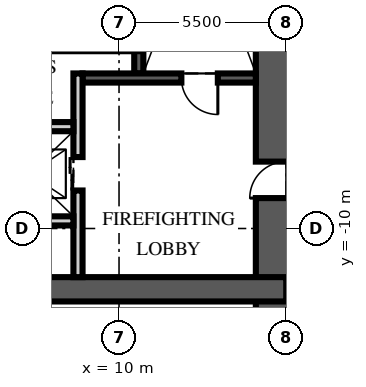
"""IFC4 building model, lengths in metres.
Left out: names, types, materials, properties, quantities, classifications, styles, units other than length and angle.
Written with IfcOpenShell. Run it as: python <this file> out.ifc"""

import sys

from ifc_helpers import new_model, si_unit, direction, frame, frame_2d, origin, place, context, subcontext, project, spatial, rectangle, extrude, element, fill, save


model = new_model("IFC4")
c1 = context("Model", 3, precision=1e-05, world=origin(), true_north=direction((0.0, 1.0)))
c2 = subcontext(c1, "Body", "Model", "MODEL_VIEW")
j1 = project(units=[si_unit("LENGTHUNIT", "METRE"), si_unit("PLANEANGLEUNIT", "RADIAN")], contexts=[c1])
p1 = place(None, origin())
s1 = spatial("IfcSite", under=j1, at=p1, CompositionType="ELEMENT")
p2 = place(p1, origin())
s2 = spatial("IfcBuilding", under=s1, at=p2, CompositionType="ELEMENT")
p3 = place(p2, frame((0.0, 0.0, -9.0)))
s3 = spatial("IfcBuildingStorey", under=s2, at=p3, CompositionType="ELEMENT", Elevation=-9.0)
p4 = place(p3, frame((15.5, -15.5, -0.3), z_axis=(0.0, 0.0, 1.0), x_axis=(0.0, 1.0, 0.0)))
e1 = element("IfcWall", 1, at=p4, inside=s3, PredefinedType="SHEAR", context=c2, shape_type="SweptSolid", body=[
    extrude(rectangle(XDim=31.0, YDim=2.0, at=frame_2d((15.5, 0.0))), origin(), (0.0, 0.0, 1.0), 3.6),
])
p5 = place(p4, frame((6.5, 0.0, 0.3)))
e2 = element("IfcOpeningElement", 2, at=p5, cuts=e1, PredefinedType="OPENING", context=c2, shape_type="SweptSolid", body=[
    extrude(rectangle(XDim=1.2, YDim=2.1, at=frame_2d((0.6, 1.05))), frame((0.0, 1.01, 0.0), z_axis=(0.0, -1.0, 0.0), x_axis=(1.0, 0.0, 0.0)), (0.0, 0.0, 1.0), 2.02),
])
p6 = place(p4, frame((23.0, 0.0, 0.3)))
e3 = element("IfcOpeningElement", 3, at=p6, cuts=e1, PredefinedType="OPENING", context=c2, shape_type="SweptSolid", body=[
    extrude(rectangle(XDim=1.8, YDim=2.1, at=frame_2d((0.9, 1.05))), frame((0.0, 1.01, 0.0), z_axis=(0.0, -1.0, 0.0), x_axis=(1.0, 0.0, 0.0)), (0.0, 0.0, 1.0), 2.02),
])
p7 = place(p3, frame((-15.5, -12.0, -0.3), z_axis=(0.0, 0.0, 1.0), x_axis=(1.0, 0.0, 0.0)))
e4 = element("IfcWall", 4, at=p7, inside=s3, PredefinedType="SHEAR", context=c2, shape_type="SweptSolid", body=[
    extrude(rectangle(XDim=31.0, YDim=0.8, at=frame_2d((15.5, 0.0))), origin(), (0.0, 0.0, 1.0), 3.6),
])
p8 = place(p3, frame((10.65, -4.9, 0.0), z_axis=(0.0, 0.0, 1.0), x_axis=(0.0, 1.0, 0.0)))
e5 = element("IfcWall", 5, at=p8, inside=s3, PredefinedType="SOLIDWALL", context=c2, shape_type="SweptSolid", body=[
    extrude(rectangle(XDim=10.1, YDim=0.3, at=frame_2d((5.05, 0.0))), origin(), (0.0, 0.0, 1.0), 3.3),
])
p9 = place(p3, frame((14.5, -5.05, 0.0), z_axis=(0.0, 0.0, 1.0), x_axis=(-1.0, 0.0, 0.0)))
e6 = element("IfcWall", 6, at=p9, inside=s3, PredefinedType="SOLIDWALL", context=c2, shape_type="SweptSolid", body=[
    extrude(rectangle(XDim=5.7, YDim=0.3, at=frame_2d((2.85, 0.0))), origin(), (0.0, 0.0, 1.0), 3.3),
])
p10 = place(p9, frame((1.25, 0.0, 0.0)))
e7 = element("IfcOpeningElement", 7, at=p10, cuts=e6, PredefinedType="OPENING", context=c2, shape_type="SweptSolid", body=[
    extrude(rectangle(XDim=1.2, YDim=2.1, at=frame_2d((0.6, 1.05))), frame((0.0, 0.16, 0.0), z_axis=(0.0, -1.0, 0.0), x_axis=(1.0, 0.0, 0.0)), (0.0, 0.0, 1.0), 0.32),
])
p11 = place(p3, frame((8.65, -11.6, 0.0), z_axis=(0.0, 0.0, 1.0), x_axis=(0.0, 1.0, 0.0)))
e8 = element("IfcWall", 8, at=p11, inside=s3, PredefinedType="PARTITIONING", context=c2, shape_type="SweptSolid", body=[
    extrude(rectangle(XDim=6.7, YDim=0.3, at=frame_2d((3.35, 0.0))), origin(), (0.0, 0.0, 1.0), 3.3),
])
p12 = place(p11, frame((2.85, 0.0, 0.0)))
e9 = element("IfcOpeningElement", 9, at=p12, cuts=e8, PredefinedType="OPENING", context=c2, shape_type="SweptSolid", body=[
    extrude(rectangle(XDim=1.1, YDim=2.1, at=frame_2d((0.55, 1.05))), frame((0.0, 0.16, 0.0), z_axis=(0.0, -1.0, 0.0), x_axis=(1.0, 0.0, 0.0)), (0.0, 0.0, 1.0), 0.32),
])
p13 = place(p3, frame((-8.5, -6.65, 0.0), z_axis=(0.0, 0.0, 1.0), x_axis=(1.0, 0.0, 0.0)))
e10 = element("IfcWall", 10, at=p13, inside=s3, PredefinedType="PARTITIONING", context=c2, shape_type="SweptSolid", body=[
    extrude(rectangle(XDim=17.0, YDim=0.3, at=frame_2d((8.5, 0.0))), origin(), (0.0, 0.0, 1.0), 3.3),
])
p14 = place(p13, frame((7.8, 0.0, 0.0)))
e11 = element("IfcOpeningElement", 11, at=p14, cuts=e10, PredefinedType="OPENING", context=c2, shape_type="SweptSolid", body=[
    extrude(rectangle(XDim=1.3, YDim=2.4, at=frame_2d((0.65, 1.2))), frame((0.0, 0.16, 0.0), z_axis=(0.0, -1.0, 0.0), x_axis=(1.0, 0.0, 0.0)), (0.0, 0.0, 1.0), 0.32),
])
p15 = place(p13, frame((5.65, 0.0, 0.0)))
e12 = element("IfcOpeningElement", 12, at=p15, cuts=e10, PredefinedType="OPENING", context=c2, shape_type="SweptSolid", body=[
    extrude(rectangle(XDim=0.9, YDim=2.1, at=frame_2d((0.45, 1.05))), frame((0.0, 0.16, 0.0), z_axis=(0.0, -1.0, 0.0), x_axis=(1.0, 0.0, 0.0)), (0.0, 0.0, 1.0), 0.32),
])
p16 = place(p13, frame((10.4, 0.0, 0.0)))
e13 = element("IfcOpeningElement", 13, at=p16, cuts=e10, PredefinedType="OPENING", context=c2, shape_type="SweptSolid", body=[
    extrude(rectangle(XDim=0.9, YDim=2.1, at=frame_2d((0.45, 1.05))), frame((0.0, 0.16, 0.0), z_axis=(0.0, -1.0, 0.0), x_axis=(1.0, 0.0, 0.0)), (0.0, 0.0, 1.0), 0.32),
])
p17 = place(p3, frame((5.6, -9.75, 0.0), z_axis=(0.0, 0.0, 1.0), x_axis=(1.0, 0.0, 0.0)))
e14 = element("IfcWall", 14, at=p17, inside=s3, PredefinedType="PARTITIONING", context=c2, shape_type="SweptSolid", body=[
    extrude(rectangle(XDim=2.9, YDim=0.3, at=frame_2d((1.45, 0.0))), origin(), (0.0, 0.0, 1.0), 3.3),
])
p18 = place(p10, origin())
e15 = element("IfcDoor", 15, at=p18, inside=s3, OperationType="SINGLE_SWING_LEFT", PredefinedType="DOOR", context=c2, shape_type="SweptSolid", body=[
    extrude(rectangle(XDim=1.2, YDim=2.1, at=frame_2d((0.6, 1.05))), frame((0.0, 0.025, 0.0), z_axis=(0.0, -1.0, 0.0), x_axis=(1.0, 0.0, 0.0)), (0.0, 0.0, 1.0), 0.05),
])
fill(e7, e15)
p19 = place(p5, origin())
e16 = element("IfcDoor", 16, at=p19, inside=s3, OperationType="SINGLE_SWING_LEFT", PredefinedType="DOOR", context=c2, shape_type="SweptSolid", body=[
    extrude(rectangle(XDim=1.2, YDim=2.1, at=frame_2d((0.6, 1.05))), frame((0.0, 0.025, 0.0), z_axis=(0.0, -1.0, 0.0), x_axis=(1.0, 0.0, 0.0)), (0.0, 0.0, 1.0), 0.05),
])
fill(e2, e16)
p20 = place(p12, origin())
e17 = element("IfcDoor", 17, at=p20, inside=s3, OperationType="DOUBLE_DOOR_SLIDING", PredefinedType="DOOR", context=c2, shape_type="SweptSolid", body=[
    extrude(rectangle(XDim=1.1, YDim=2.1, at=frame_2d((0.55, 1.05))), frame((0.0, 0.025, 0.0), z_axis=(0.0, -1.0, 0.0), x_axis=(1.0, 0.0, 0.0)), (0.0, 0.0, 1.0), 0.05),
])
fill(e9, e17)
save(model, sys.argv[1])
